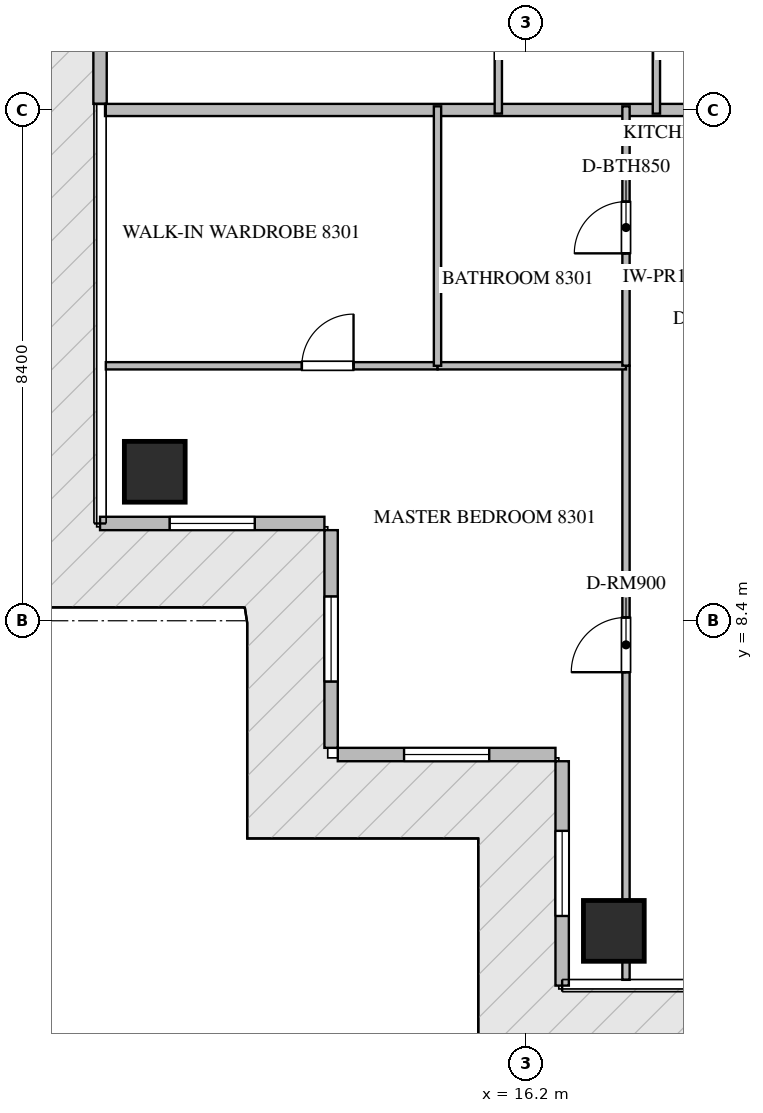
"""IFC4 building model, lengths in metres.
Left out: names, types, materials, properties, quantities, classifications, styles, units other than length and angle.
Written with IfcOpenShell. Run it as: python <this file> out.ifc"""

import sys

from ifc_helpers import new_model, si_unit, direction, frame, frame_2d, origin, origin_2d, place, context, subcontext, project, spatial, rectangle, extrude, source, transform, mapped, element, fill, save


model = new_model("IFC4")
c1 = context("Model", 3, precision=1e-05, world=origin(), true_north=direction((0.0, 1.0)))
c2 = subcontext(c1, "Body", "Model", "MODEL_VIEW")
j1 = project(units=[si_unit("LENGTHUNIT", "METRE"), si_unit("PLANEANGLEUNIT", "RADIAN")], contexts=[c1])
p1 = place(None, origin())
s1 = spatial("IfcSite", under=j1, at=p1, CompositionType="ELEMENT")
p2 = place(p1, origin())
s2 = spatial("IfcBuilding", under=s1, at=p2, CompositionType="ELEMENT")
p3 = place(p2, frame((0.0, 0.0, 333.95)))
s3 = spatial("IfcBuildingStorey", under=s2, at=p3, CompositionType="ELEMENT", Elevation=333.95)
m1 = source(origin(), c2, "Body", "SweptSolid", [
    extrude(rectangle(XDim=1.0, YDim=1.0, at=origin_2d()), origin(), (0.0, 0.0, 1.0), 3.87),
])
for number, where, z_axis, x_axis in (
    (1, (17.65, 3.3, -0.26), (0.0, 0.0, 1.0), (1.0, 0.0, 0.0)),
    (2, (10.1, 10.85, -0.26), (0.0, 0.0, 1.0), (1.0, 0.0, 0.0)),
):
    element("IfcColumn", number, at=place(p3, frame(where, z_axis=z_axis, x_axis=x_axis)), inside=s3, PredefinedType="COLUMN", context=c2, shape_type="MappedRepresentation", body=[
        mapped(m1, transform((0.0, 0.0, 0.0), scale=1.0)),
    ])
p4 = place(p3, frame((9.2, 19.9, 0.0), z_axis=(0.0, 0.0, 1.0), x_axis=(0.0, -1.0, 0.0)))
e3 = element("IfcWall", 3, at=p4, inside=s3, PredefinedType="ELEMENTEDWALL", context=c2, shape_type="SweptSolid", body=[
    extrude(rectangle(XDim=3.0, YDim=0.22, at=frame_2d((1.5, 0.0))), origin(), (0.0, 0.0, 1.0), 3.595),
])
p5 = place(p4, frame((0.95, 0.0, 0.0)))
e4 = element("IfcOpeningElement", 4, at=p5, cuts=e3, PredefinedType="OPENING", context=c2, shape_type="SweptSolid", body=[
    extrude(rectangle(XDim=1.1, YDim=2.2, at=frame_2d((0.55, 1.1))), frame((0.0, 0.12, 0.0), z_axis=(0.0, -1.0, 0.0), x_axis=(1.0, 0.0, 0.0)), (0.0, 0.0, 1.0), 0.24),
])
p6 = place(p3, frame((9.2, 10.0, 0.0), z_axis=(0.0, 0.0, 1.0), x_axis=(1.0, 0.0, 0.0)))
e5 = element("IfcWall", 5, at=p6, inside=s3, PredefinedType="ELEMENTEDWALL", context=c2, shape_type="SweptSolid", body=[
    extrude(rectangle(XDim=3.69, YDim=0.22, at=frame_2d((1.845, 0.0))), origin(), (0.0, 0.0, 1.0), 3.595),
])
p7 = place(p6, frame((1.145, 0.0, 0.65)))
e6 = element("IfcOpeningElement", 6, at=p7, cuts=e5, PredefinedType="OPENING", context=c2, shape_type="SweptSolid", body=[
    extrude(rectangle(XDim=1.4, YDim=1.35, at=frame_2d((0.7, 0.675))), frame((0.0, 0.12, 0.0), z_axis=(0.0, -1.0, 0.0), x_axis=(1.0, 0.0, 0.0)), (0.0, 0.0, 1.0), 0.24),
])
p8 = place(p3, frame((13.0, 9.89, 0.0), z_axis=(0.0, 0.0, 1.0), x_axis=(0.0, -1.0, 0.0)))
e7 = element("IfcWall", 7, at=p8, inside=s3, PredefinedType="ELEMENTEDWALL", context=c2, shape_type="SweptSolid", body=[
    extrude(rectangle(XDim=3.58, YDim=0.22, at=frame_2d((1.79, 0.0))), origin(), (0.0, 0.0, 1.0), 3.595),
])
p9 = place(p8, frame((1.09, 0.0, 0.65)))
e8 = element("IfcOpeningElement", 8, at=p9, cuts=e7, PredefinedType="OPENING", context=c2, shape_type="SweptSolid", body=[
    extrude(rectangle(XDim=1.4, YDim=1.35, at=frame_2d((0.7, 0.675))), frame((0.0, 0.12, 0.0), z_axis=(0.0, -1.0, 0.0), x_axis=(1.0, 0.0, 0.0)), (0.0, 0.0, 1.0), 0.24),
])
p10 = place(p3, frame((13.11, 6.2, 0.0), z_axis=(0.0, 0.0, 1.0), x_axis=(1.0, 0.0, 0.0)))
e9 = element("IfcWall", 9, at=p10, inside=s3, PredefinedType="ELEMENTEDWALL", context=c2, shape_type="SweptSolid", body=[
    extrude(rectangle(XDim=3.58, YDim=0.22, at=frame_2d((1.79, 0.0))), origin(), (0.0, 0.0, 1.0), 3.595),
])
p11 = place(p10, frame((1.09, 0.0, 0.65)))
e10 = element("IfcOpeningElement", 10, at=p11, cuts=e9, PredefinedType="OPENING", context=c2, shape_type="SweptSolid", body=[
    extrude(rectangle(XDim=1.4, YDim=1.35, at=frame_2d((0.7, 0.675))), frame((0.0, 0.12, 0.0), z_axis=(0.0, -1.0, 0.0), x_axis=(1.0, 0.0, 0.0)), (0.0, 0.0, 1.0), 0.24),
])
p12 = place(p3, frame((16.8, 6.09, 0.0), z_axis=(0.0, 0.0, 1.0), x_axis=(0.0, -1.0, 0.0)))
e11 = element("IfcWall", 11, at=p12, inside=s3, PredefinedType="ELEMENTEDWALL", context=c2, shape_type="SweptSolid", body=[
    extrude(rectangle(XDim=3.69, YDim=0.22, at=frame_2d((1.845, 0.0))), origin(), (0.0, 0.0, 1.0), 3.595),
])
p13 = place(p12, frame((1.145, 0.0, 0.65)))
e12 = element("IfcOpeningElement", 12, at=p13, cuts=e11, PredefinedType="OPENING", context=c2, shape_type="SweptSolid", body=[
    extrude(rectangle(XDim=1.4, YDim=1.35, at=frame_2d((0.7, 0.675))), frame((0.0, 0.12, 0.0), z_axis=(0.0, -1.0, 0.0), x_axis=(1.0, 0.0, 0.0)), (0.0, 0.0, 1.0), 0.24),
])
p14 = place(p3, frame((9.282, 16.8, 0.0), z_axis=(0.0, 0.0, 1.0), x_axis=(1.0, 0.0, 0.0)))
e13 = element("IfcWall", 13, at=p14, inside=s3, PredefinedType="PARTITIONING", context=c2, shape_type="SweptSolid", body=[
    extrude(rectangle(XDim=11.618, YDim=0.2, at=frame_2d((5.809, 0.0))), origin(), (0.0, 0.0, 1.0), 3.61),
])
p15 = place(p3, frame((17.85, 14.05, 0.0), z_axis=(0.0, 0.0, 1.0), x_axis=(1.0, 0.0, 0.0)))
e14 = element("IfcWall", 14, at=p15, inside=s3, PredefinedType="PARTITIONING", context=c2, shape_type="SweptSolid", body=[
    extrude(rectangle(XDim=2.85, YDim=0.12, at=frame_2d((1.425, 0.0))), origin(), (0.0, 0.0, 1.0), 3.61),
])
p16 = place(p15, frame((1.0, 0.0, 0.0)))
e15 = element("IfcOpeningElement", 15, at=p16, cuts=e14, PredefinedType="OPENING", context=c2, shape_type="SweptSolid", body=[
    extrude(rectangle(XDim=0.85, YDim=2.1, at=frame_2d((0.425, 1.05))), frame((0.0, 0.07, 0.0), z_axis=(0.0, -1.0, 0.0), x_axis=(1.0, 0.0, 0.0)), (0.0, 0.0, 1.0), 0.14),
])
p17 = place(p3, frame((17.85, 2.495, 0.0), z_axis=(0.0, 0.0, 1.0), x_axis=(0.0, 1.0, 0.0)))
e16 = element("IfcWall", 16, at=p17, inside=s3, PredefinedType="PARTITIONING", context=c2, shape_type="SweptSolid", body=[
    extrude(rectangle(XDim=10.098, YDim=0.12, at=frame_2d((5.049, 0.0))), origin(), (0.0, 0.0, 1.0), 2.445),
])
p18 = place(p17, frame((5.059, 0.0, 0.0)))
e17 = element("IfcOpeningElement", 17, at=p18, cuts=e16, PredefinedType="OPENING", context=c2, shape_type="SweptSolid", body=[
    extrude(rectangle(XDim=0.9, YDim=2.1, at=frame_2d((0.45, 1.05))), frame((0.0, 0.07, 0.0), z_axis=(0.0, -1.0, 0.0), x_axis=(1.0, 0.0, 0.0)), (0.0, 0.0, 1.0), 0.14),
])
p19 = place(p3, frame((9.295, 12.593, 0.0), z_axis=(0.0, 0.0, 1.0), x_axis=(1.0, 0.0, 0.0)))
e18 = element("IfcWall", 18, at=p19, inside=s3, PredefinedType="PARTITIONING", context=c2, shape_type="SweptSolid", body=[
    extrude(rectangle(XDim=5.455, YDim=0.12, at=frame_2d((2.728, 0.0))), origin(), (0.0, 0.0, 1.0), 3.61),
])
p20 = place(p19, frame((3.224, 0.0, 0.0)))
e19 = element("IfcOpeningElement", 19, at=p20, cuts=e18, PredefinedType="OPENING", context=c2, shape_type="SweptSolid", body=[
    extrude(rectangle(XDim=0.85, YDim=2.1, at=frame_2d((0.425, 1.05))), frame((0.0, 0.07, 0.0), z_axis=(0.0, -1.0, 0.0), x_axis=(1.0, 0.0, 0.0)), (0.0, 0.0, 1.0), 0.14),
])
p21 = place(p3, frame((14.752, 12.593, 0.0), z_axis=(0.0, 0.0, 1.0), x_axis=(1.0, 0.0, 0.0)))
e20 = element("IfcWall", 20, at=p21, inside=s3, PredefinedType="PARTITIONING", context=c2, shape_type="SweptSolid", body=[
    extrude(rectangle(XDim=3.098, YDim=0.12, at=frame_2d((1.549, 0.0))), origin(), (0.0, 0.0, 1.0), 3.61),
])
p22 = place(p3, frame((14.75, 12.593, 0.0), z_axis=(0.0, 0.0, 1.0), x_axis=(0.0, 1.0, 0.0)))
e21 = element("IfcWall", 21, at=p22, inside=s3, PredefinedType="PARTITIONING", context=c2, shape_type="SweptSolid", body=[
    extrude(rectangle(XDim=4.267, YDim=0.12, at=frame_2d((2.134, 0.0))), origin(), (0.0, 0.0, 1.0), 3.61),
])
p23 = place(p3, frame((17.85, 12.595, 0.0), z_axis=(0.0, 0.0, 1.0), x_axis=(0.0, 1.0, 0.0)))
e22 = element("IfcWall", 22, at=p23, inside=s3, PredefinedType="PARTITIONING", context=c2, shape_type="SweptSolid", body=[
    extrude(rectangle(XDim=4.265, YDim=0.12, at=frame_2d((2.133, 0.0))), origin(), (0.0, 0.0, 1.0), 2.445),
])
p24 = place(p23, frame((1.847, 0.0, 0.0)))
e23 = element("IfcOpeningElement", 23, at=p24, cuts=e22, PredefinedType="OPENING", context=c2, shape_type="SweptSolid", body=[
    extrude(rectangle(XDim=0.85, YDim=2.1, at=frame_2d((0.425, 1.05))), frame((0.0, 0.07, 0.0), z_axis=(0.0, -1.0, 0.0), x_axis=(1.0, 0.0, 0.0)), (0.0, 0.0, 1.0), 0.14),
])
for number, where, z_axis, x_axis in (
    (24, (18.35, 16.74, 0.0), (0.0, 0.0, 1.0), (0.0, 1.0, 0.0)),
    (25, (15.75, 16.74, 0.0), (0.0, 0.0, 1.0), (0.0, 1.0, 0.0)),
):
    element("IfcWall", number, at=place(p3, frame(where, z_axis=z_axis, x_axis=x_axis)), inside=s3, PredefinedType="PARTITIONING", context=c2, shape_type="SweptSolid", body=[
        extrude(rectangle(XDim=2.66, YDim=0.12, at=frame_2d((1.33, 0.0))), origin(), (0.0, 0.0, 1.0), 3.61),
    ])
m2 = source(origin(), c2, "Body", "SweptSolid", [
    extrude(rectangle(XDim=1.4, YDim=1.35, at=frame_2d((0.7, 0.675))), frame((0.0, 0.03, 0.0), z_axis=(0.0, -1.0, 0.0), x_axis=(1.0, 0.0, 0.0)), (0.0, 0.0, 1.0), 0.06),
])
p25 = place(p7, origin())
e26 = element("IfcWindow", 26, at=p25, inside=s3, PartitioningType="SINGLE_PANEL", PredefinedType="WINDOW", context=c2, shape_type="MappedRepresentation", body=[
    mapped(m2, transform((0.0, 0.0, 0.0), scale=1.0)),
])
fill(e6, e26)
p26 = place(p9, origin())
e27 = element("IfcWindow", 27, at=p26, inside=s3, PartitioningType="SINGLE_PANEL", PredefinedType="WINDOW", context=c2, shape_type="MappedRepresentation", body=[
    mapped(m2, transform((0.0, 0.0, 0.0), scale=1.0)),
])
fill(e8, e27)
p27 = place(p11, origin())
e28 = element("IfcWindow", 28, at=p27, inside=s3, PartitioningType="SINGLE_PANEL", PredefinedType="WINDOW", context=c2, shape_type="MappedRepresentation", body=[
    mapped(m2, transform((0.0, 0.0, 0.0), scale=1.0)),
])
fill(e10, e28)
p28 = place(p13, origin())
e29 = element("IfcWindow", 29, at=p28, inside=s3, PartitioningType="SINGLE_PANEL", PredefinedType="WINDOW", context=c2, shape_type="MappedRepresentation", body=[
    mapped(m2, transform((0.0, 0.0, 0.0), scale=1.0)),
])
fill(e12, e29)
m3 = source(origin(), c2, "Body", "SweptSolid", [
    extrude(rectangle(XDim=0.9, YDim=2.1, at=frame_2d((0.45, 1.05))), frame((0.0, 0.025, 0.0), z_axis=(0.0, -1.0, 0.0), x_axis=(1.0, 0.0, 0.0)), (0.0, 0.0, 1.0), 0.05),
])
p29 = place(p18, origin())
e30 = element("IfcDoor", 30, at=p29, inside=s3, OperationType="SINGLE_SWING_LEFT", PredefinedType="DOOR", context=c2, shape_type="MappedRepresentation", body=[
    mapped(m3, transform((0.0, 0.0, 0.0), scale=1.0)),
])
fill(e17, e30)
m4 = source(origin(), c2, "Body", "SweptSolid", [
    extrude(rectangle(XDim=0.85, YDim=2.1, at=frame_2d((0.425, 1.05))), frame((0.0, 0.025, 0.0), z_axis=(0.0, -1.0, 0.0), x_axis=(1.0, 0.0, 0.0)), (0.0, 0.0, 1.0), 0.05),
])
p30 = place(p20, origin())
e31 = element("IfcDoor", 31, at=p30, inside=s3, OperationType="SINGLE_SWING_RIGHT", PredefinedType="DOOR", context=c2, shape_type="MappedRepresentation", body=[
    mapped(m4, transform((0.0, 0.0, 0.0), scale=1.0)),
])
fill(e19, e31)
p31 = place(p24, origin())
e32 = element("IfcDoor", 32, at=p31, inside=s3, OperationType="SINGLE_SWING_LEFT", PredefinedType="DOOR", context=c2, shape_type="MappedRepresentation", body=[
    mapped(m4, transform((0.0, 0.0, 0.0), scale=1.0)),
])
fill(e23, e32)
save(model, sys.argv[1])
